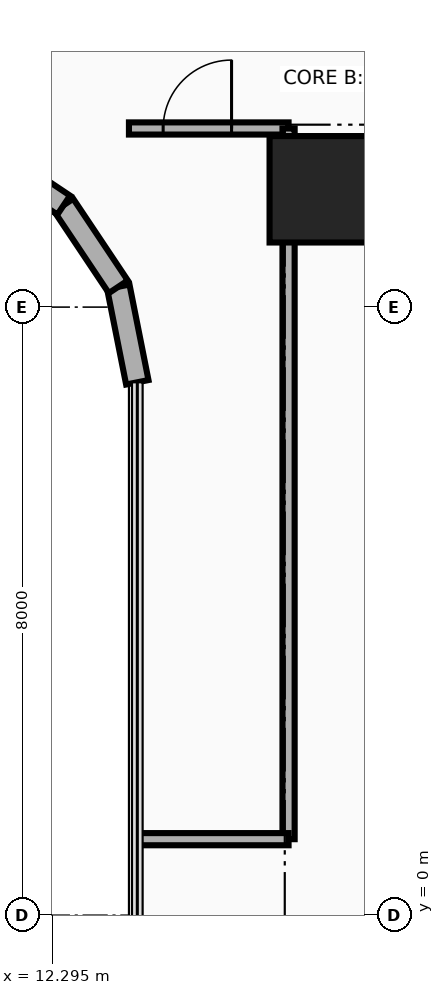
"""IFC4 building model, lengths in metres.
Left out: names, types, materials, properties, quantities, classifications, styles, units other than length and angle.
Written with IfcOpenShell. Run it as: python <this file> out.ifc"""

import sys

from ifc_helpers import new_model, si_unit, direction, frame, frame_2d, origin, origin_2d, place, context, subcontext, project, spatial, rectangle, extrude, source, transform, mapped, element, fill, save


model = new_model("IFC4")
c1 = context("Model", 3, precision=1e-05, world=origin(), true_north=direction((0.0, 1.0)))
c2 = subcontext(c1, "Body", "Model", "MODEL_VIEW")
j1 = project(units=[si_unit("LENGTHUNIT", "METRE"), si_unit("PLANEANGLEUNIT", "RADIAN")], contexts=[c1])
p1 = place(None, origin())
s1 = spatial("IfcSite", under=j1, at=p1, CompositionType="ELEMENT")
p2 = place(p1, origin())
s2 = spatial("IfcBuilding", under=s1, at=p2, CompositionType="ELEMENT")
p3 = place(p2, frame((0.0, 0.0, 48.2)))
s3 = spatial("IfcBuildingStorey", under=s2, at=p3, CompositionType="ELEMENT", Elevation=48.2)
p4 = place(p3, frame((15.85, 9.55, 0.0), z_axis=(0.0, 0.0, 1.0), x_axis=(1.0, 0.0, 0.0)))
e1 = element("IfcWall", 1, at=p4, inside=s3, PredefinedType="SHEAR", context=c2, shape_type="SweptSolid", body=[
    extrude(rectangle(XDim=9.0, YDim=0.7, at=frame_2d((4.5, 0.0))), origin(), (0.0, 0.0, 1.0), 3.46),
])
m1 = source(origin(), c2, "Body", "SweptSolid", [
    extrude(rectangle(XDim=1.4, YDim=1.4, at=origin_2d()), origin(), (0.0, 0.0, 1.0), 3.7),
])
p5 = place(p3, frame((15.85, 9.55, 0.0), z_axis=(0.0, 0.0, 1.0), x_axis=(1.0, 0.0, 0.0)))
e2 = element("IfcColumn", 2, at=p5, inside=s3, PredefinedType="COLUMN", context=c2, shape_type="MappedRepresentation", body=[
    mapped(m1, transform((0.0, 0.0, 0.0), x_axis=(1.0, 0.0, 0.0), y_axis=(0.0, 1.0, 0.0), z_axis=(0.0, 0.0, 1.0), scale=1.0)),
])
p6 = place(p3, frame((13.41, 7.011, 0.0), z_axis=(0.0, 0.0, 1.0), x_axis=(-0.195090163074, 0.980785312019, 0.0)))
e3 = element("IfcWall", 3, at=p6, inside=s3, PredefinedType="SOLIDWALL", context=c2, shape_type="SweptSolid", body=[
    extrude(rectangle(XDim=1.281, YDim=0.3, at=frame_2d((0.641, 0.0))), origin(), (0.0, 0.0, 1.0), 3.46),
])
for number, where, z_axis, x_axis in (
    (4, (13.16, 8.268, 0.0), (0.0, 0.0, 1.0), (-0.556, 0.831, 0.0)),
    (5, (12.442, 9.342, 0.0), (0.0, 0.0, 1.0), (-0.831, 0.556, 0.0)),
):
    element("IfcWall", number, at=place(p3, frame(where, z_axis=z_axis, x_axis=x_axis)), inside=s3, PredefinedType="SOLIDWALL", context=c2, shape_type="SweptSolid", body=[
        extrude(rectangle(XDim=1.292, YDim=0.3, at=frame_2d((0.646, 0.0))), origin(), (0.0, 0.0, 1.0), 3.46),
    ])
p7 = place(p3, frame((13.3, 10.35, 0.0), z_axis=(0.0, 0.0, 1.0), x_axis=(1.0, 0.0, 0.0)))
e6 = element("IfcWall", 6, at=p7, inside=s3, PredefinedType="PARTITIONING", context=c2, shape_type="SweptSolid", body=[
    extrude(rectangle(XDim=2.1, YDim=0.16, at=frame_2d((1.05, 0.0))), origin(), (0.0, 0.0, 1.0), 2.583),
])
p8 = place(p7, frame((0.45, 0.0, 0.0)))
e7 = element("IfcOpeningElement", 7, at=p8, cuts=e6, PredefinedType="OPENING", context=c2, shape_type="SweptSolid", body=[
    extrude(rectangle(XDim=0.9, YDim=2.1, at=frame_2d((0.45, 1.05))), frame((0.0, 0.095, 0.0), z_axis=(0.0, -1.0, 0.0), x_axis=(1.0, 0.0, 0.0)), (0.0, 0.0, 1.0), 0.19),
])
p9 = place(p3, frame((15.4, 1.0, 0.0), z_axis=(0.0, 0.0, 1.0), x_axis=(0.0, 1.0, 0.0)))
e8 = element("IfcWall", 8, at=p9, inside=s3, PredefinedType="PARTITIONING", context=c2, shape_type="SweptSolid", body=[
    extrude(rectangle(XDim=9.35, YDim=0.16, at=frame_2d((4.675, 0.0))), origin(), (0.0, 0.0, 1.0), 2.245),
])
p10 = place(p3, frame((13.41, 1.0, 0.0), z_axis=(0.0, 0.0, 1.0), x_axis=(1.0, 0.0, 0.0)))
e9 = element("IfcWall", 9, at=p10, inside=s3, PredefinedType="PARTITIONING", context=c2, shape_type="SweptSolid", body=[
    extrude(rectangle(XDim=1.99, YDim=0.16, at=frame_2d((0.995, 0.0))), origin(), (0.0, 0.0, 1.0), 2.245),
])
p11 = place(p8, origin())
e10 = element("IfcDoor", 10, at=p11, inside=s3, OperationType="SINGLE_SWING_RIGHT", PredefinedType="DOOR", context=c2, shape_type="SweptSolid", body=[
    extrude(rectangle(XDim=0.9, YDim=2.1, at=frame_2d((0.45, 1.05))), frame((0.0, 0.025, 0.0), z_axis=(0.0, -1.0, 0.0), x_axis=(1.0, 0.0, 0.0)), (0.0, 0.0, 1.0), 0.05),
])
fill(e7, e10)
save(model, sys.argv[1])
